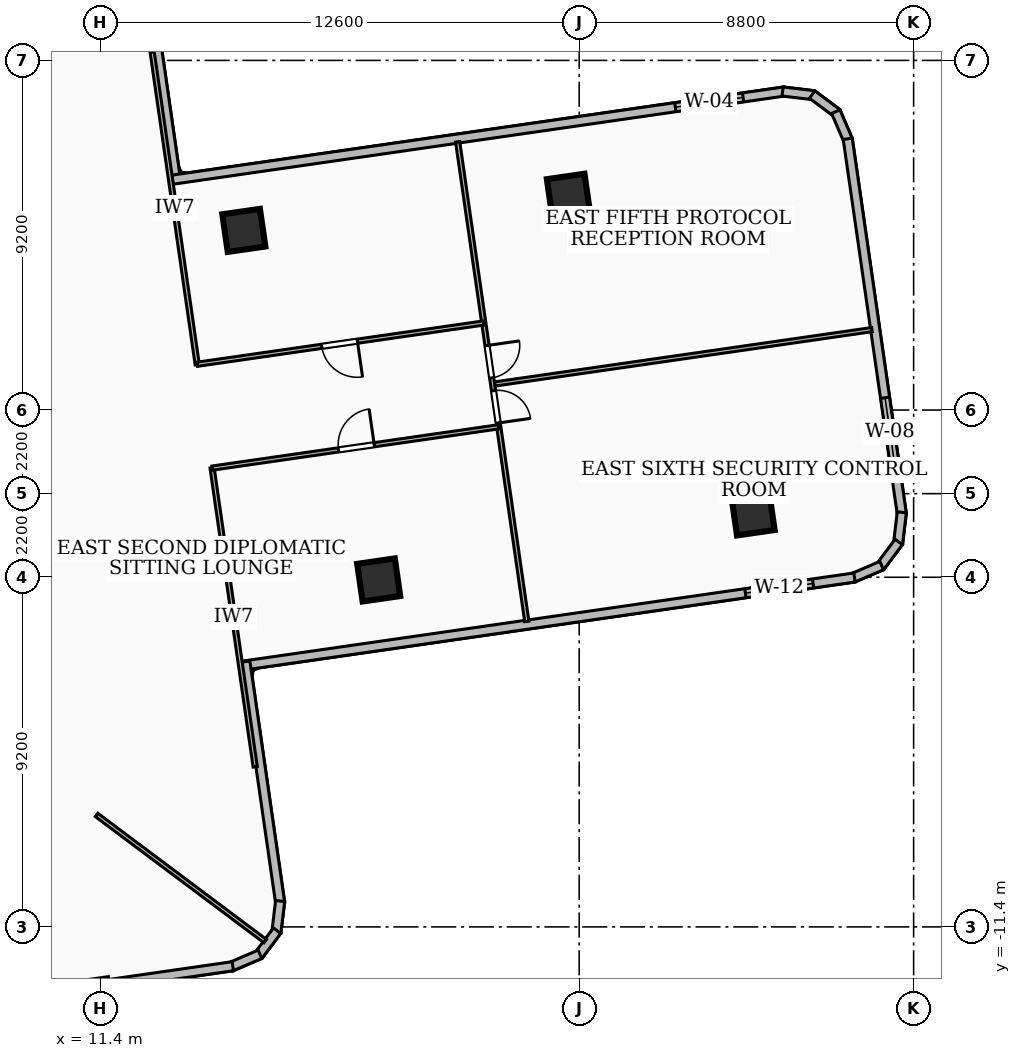
"""IFC4 building model, lengths in metres.
Left out: names, types, materials, properties, quantities, classifications, styles, units other than length and angle.
Written with IfcOpenShell. Run it as: python <this file> out.ifc"""

import sys

from ifc_helpers import new_model, si_unit, direction, frame, frame_2d, origin, origin_2d, place, context, subcontext, project, spatial, rectangle, extrude, element, fill, save


model = new_model("IFC4")
c1 = context("Model", 3, precision=1e-05, world=origin(), true_north=direction((0.0, 1.0)))
c2 = subcontext(c1, "Body", "Model", "MODEL_VIEW")
j1 = project(units=[si_unit("LENGTHUNIT", "METRE"), si_unit("PLANEANGLEUNIT", "RADIAN")], contexts=[c1])
p1 = place(None, origin())
s1 = spatial("IfcSite", under=j1, at=p1, CompositionType="ELEMENT")
p2 = place(p1, origin())
s2 = spatial("IfcBuilding", under=s1, at=p2, CompositionType="ELEMENT")
p3 = place(p2, frame((0.0, 0.0, 85.68)))
s3 = spatial("IfcBuildingStorey", under=s2, at=p3, CompositionType="ELEMENT", Elevation=85.68)
for number, where, z_axis, x_axis in (
    (1, (18.724, -2.271, 0.0), (0.0, 0.0, 1.0), (0.99, 0.143, 0.0)),
    (2, (15.175, 6.927, 0.0), (0.0, 0.0, 1.0), (0.99, 0.143, 0.0)),
    (3, (28.576, -0.533, 0.0), (0.0, 0.0, 1.0), (0.99, 0.143, 0.0)),
    (4, (23.715, 7.851, 0.0), (0.0, 0.0, 1.0), (0.99, 0.143, 0.0)),
):
    element("IfcColumn", number, at=place(p3, frame(where, z_axis=z_axis, x_axis=x_axis)), inside=s3, PredefinedType="COLUMN", context=c2, shape_type="SweptSolid", body=[
        extrude(rectangle(XDim=1.0, YDim=1.0, at=origin_2d()), origin(), (0.0, 0.0, 1.0), 3.6),
    ])
p4 = place(p3, frame((12.434, 14.885, 0.0), z_axis=(0.0, 0.0, 1.0), x_axis=(0.142692500085, -0.989767068769, 0.0)))
e5 = element("IfcWall", 5, at=p4, inside=s3, PredefinedType="SOLIDWALL", context=c2, shape_type="SweptSolid", body=[
    extrude(rectangle(XDim=6.775, YDim=0.24, at=frame_2d((3.388, 0.0))), origin(), (0.0, 0.0, 1.0), 3.34),
])
p5 = place(p3, frame((13.292, 8.26, 0.0), z_axis=(0.0, 0.0, 1.0), x_axis=(0.989770197797, 0.142670794326, 0.0)))
e6 = element("IfcWall", 6, at=p5, inside=s3, PredefinedType="SOLIDWALL", context=c2, shape_type="SweptSolid", body=[
    extrude(rectangle(XDim=16.275, YDim=0.24, at=frame_2d((8.138, 0.0))), origin(), (0.0, 0.0, 1.0), 3.34),
])
p6 = place(p5, frame((13.375, 0.0, 0.85)))
e7 = element("IfcOpeningElement", 7, at=p6, cuts=e6, PredefinedType="OPENING", context=c2, shape_type="SweptSolid", body=[
    extrude(rectangle(XDim=1.8, YDim=2.0, at=frame_2d((0.9, 1.0))), frame((0.0, 0.13, 0.0), z_axis=(0.0, -1.0, 0.0), x_axis=(1.0, 0.0, 0.0)), (0.0, 0.0, 1.0), 0.26),
])
p7 = place(p3, frame((29.351, 10.581, 0.0), z_axis=(0.0, 0.0, 1.0), x_axis=(0.992997305963, -0.118136998224, 0.0)))
e8 = element("IfcWall", 8, at=p7, inside=s3, PredefinedType="SOLIDWALL", context=c2, shape_type="SweptSolid", body=[
    extrude(rectangle(XDim=0.831, YDim=0.24, at=frame_2d((0.416, 0.0))), origin(), (0.0, 0.0, 1.0), 3.34),
])
p8 = place(p3, frame((30.131, 10.501, 0.0), z_axis=(0.0, 0.0, 1.0), x_axis=(0.800072018724, -0.599903963027, 0.0)))
e9 = element("IfcWall", 9, at=p8, inside=s3, PredefinedType="SOLIDWALL", context=c2, shape_type="SweptSolid", body=[
    extrude(rectangle(XDim=0.813, YDim=0.24, at=frame_2d((0.407, 0.0))), origin(), (0.0, 0.0, 1.0), 3.34),
])
p9 = place(p3, frame((30.752, 10.051, 0.0), z_axis=(0.0, 0.0, 1.0), x_axis=(0.395089773053, -0.91864251547, 0.0)))
e10 = element("IfcWall", 10, at=p9, inside=s3, PredefinedType="SOLIDWALL", context=c2, shape_type="SweptSolid", body=[
    extrude(rectangle(XDim=0.831, YDim=0.24, at=frame_2d((0.415, 0.0))), origin(), (0.0, 0.0, 1.0), 3.34),
])
p10 = place(p3, frame((31.066, 9.336, 0.0), z_axis=(0.0, 0.0, 1.0), x_axis=(0.142705661552, -0.98976517122, 0.0)))
e11 = element("IfcWall", 11, at=p10, inside=s3, PredefinedType="SOLIDWALL", context=c2, shape_type="SweptSolid", body=[
    extrude(rectangle(XDim=9.979, YDim=0.24, at=frame_2d((4.99, 0.0))), origin(), (0.0, 0.0, 1.0), 3.34),
])
p11 = place(p10, frame((6.884, 0.0, 0.85)))
e12 = element("IfcOpeningElement", 12, at=p11, cuts=e11, PredefinedType="OPENING", context=c2, shape_type="SweptSolid", body=[
    extrude(rectangle(XDim=1.8, YDim=1.8, at=frame_2d((0.9, 0.9))), frame((0.0, 0.13, 0.0), z_axis=(0.0, -1.0, 0.0), x_axis=(1.0, 0.0, 0.0)), (0.0, 0.0, 1.0), 0.26),
])
p12 = place(p3, frame((32.489, -0.491, 0.0), z_axis=(0.0, 0.0, 1.0), x_axis=(-0.119295842971, -0.992858752215, 0.0)))
e13 = element("IfcWall", 13, at=p12, inside=s3, PredefinedType="SOLIDWALL", context=c2, shape_type="SweptSolid", body=[
    extrude(rectangle(XDim=0.831, YDim=0.24, at=frame_2d((0.416, 0.0))), origin(), (0.0, 0.0, 1.0), 3.34),
])
p13 = place(p3, frame((32.408, -1.271, 0.0), z_axis=(0.0, 0.0, 1.0), x_axis=(-0.598415049045, -0.801186263659, 0.0)))
e14 = element("IfcWall", 14, at=p13, inside=s3, PredefinedType="SOLIDWALL", context=c2, shape_type="SweptSolid", body=[
    extrude(rectangle(XDim=0.814, YDim=0.24, at=frame_2d((0.407, 0.0))), origin(), (0.0, 0.0, 1.0), 3.34),
])
p14 = place(p3, frame((31.959, -1.893, 0.0), z_axis=(0.0, 0.0, 1.0), x_axis=(-0.919175455153, -0.393848299024, 0.0)))
e15 = element("IfcWall", 15, at=p14, inside=s3, PredefinedType="SOLIDWALL", context=c2, shape_type="SweptSolid", body=[
    extrude(rectangle(XDim=0.83, YDim=0.24, at=frame_2d((0.415, 0.0))), origin(), (0.0, 0.0, 1.0), 3.34),
])
p15 = place(p3, frame((31.244, -2.206, 0.0), z_axis=(0.0, 0.0, 1.0), x_axis=(-0.989771419035, -0.142662321802, 0.0)))
e16 = element("IfcWall", 16, at=p15, inside=s3, PredefinedType="SOLIDWALL", context=c2, shape_type="SweptSolid", body=[
    extrude(rectangle(XDim=16.276, YDim=0.24, at=frame_2d((8.138, 0.0))), origin(), (0.0, 0.0, 1.0), 3.34),
])
p16 = place(p15, frame((1.1, 0.0, 0.85)))
e17 = element("IfcOpeningElement", 17, at=p16, cuts=e16, PredefinedType="OPENING", context=c2, shape_type="SweptSolid", body=[
    extrude(rectangle(XDim=1.8, YDim=1.6, at=frame_2d((0.9, 0.8))), frame((0.0, 0.13, 0.0), z_axis=(0.0, -1.0, 0.0), x_axis=(1.0, 0.0, 0.0)), (0.0, 0.0, 1.0), 0.26),
])
p17 = place(p3, frame((15.215, -4.419, 0.0), z_axis=(0.0, 0.0, 1.0), x_axis=(0.14277438433, -0.989755260243, 0.0)))
e18 = element("IfcWall", 18, at=p17, inside=s3, PredefinedType="SOLIDWALL", context=c2, shape_type="SweptSolid", body=[
    extrude(rectangle(XDim=6.416, YDim=0.24, at=frame_2d((3.208, 0.0))), origin(), (0.0, 0.0, 1.0), 3.34),
])
p18 = place(p3, frame((16.13, -10.719, 0.0), z_axis=(0.0, 0.0, 1.0), x_axis=(-0.117847211411, -0.993031739051, 0.0)))
e19 = element("IfcWall", 19, at=p18, inside=s3, PredefinedType="SOLIDWALL", context=c2, shape_type="SweptSolid", body=[
    extrude(rectangle(XDim=0.831, YDim=0.24, at=frame_2d((0.416, 0.0))), origin(), (0.0, 0.0, 1.0), 3.34),
])
p19 = place(p3, frame((16.05, -11.499, 0.0), z_axis=(0.0, 0.0, 1.0), x_axis=(-0.599903963027, -0.800072018724, 0.0)))
e20 = element("IfcWall", 20, at=p19, inside=s3, PredefinedType="SOLIDWALL", context=c2, shape_type="SweptSolid", body=[
    extrude(rectangle(XDim=0.813, YDim=0.24, at=frame_2d((0.407, 0.0))), origin(), (0.0, 0.0, 1.0), 3.34),
])
p20 = place(p3, frame((15.6, -12.12, 0.0), z_axis=(0.0, 0.0, 1.0), x_axis=(-0.918795004047, -0.394735025731, 0.0)))
e21 = element("IfcWall", 21, at=p20, inside=s3, PredefinedType="SOLIDWALL", context=c2, shape_type="SweptSolid", body=[
    extrude(rectangle(XDim=0.831, YDim=0.24, at=frame_2d((0.415, 0.0))), origin(), (0.0, 0.0, 1.0), 3.34),
])
p21 = place(p3, frame((14.885, -12.434, 0.0), z_axis=(0.0, 0.0, 1.0), x_axis=(-0.989767068769, -0.142692500085, 0.0)))
e22 = element("IfcWall", 22, at=p21, inside=s3, PredefinedType="SOLIDWALL", context=c2, shape_type="SweptSolid", body=[
    extrude(rectangle(XDim=6.775, YDim=0.24, at=frame_2d((3.388, 0.0))), origin(), (0.0, 0.0, 1.0), 3.34),
])
p22 = place(p3, frame((7.766, 10.38, 0.0), z_axis=(0.0, 0.0, 1.0), x_axis=(0.598966195252, 0.800774310867, 0.0)))
e23 = element("IfcWall", 23, at=p22, inside=s3, PredefinedType="PARTITIONING", context=c2, shape_type="SweptSolid", body=[
    extrude(rectangle(XDim=6.691, YDim=0.11, at=frame_2d((3.346, 0.0))), origin(), (0.0, 0.0, 1.0), 3.34),
])
p23 = place(p3, frame((11.3, -8.454, 0.0), z_axis=(0.0, 0.0, 1.0), x_axis=(0.80074999449, -0.598998703107, 0.0)))
e24 = element("IfcWall", 24, at=p23, inside=s3, PredefinedType="PARTITIONING", context=c2, shape_type="SweptSolid", body=[
    extrude(rectangle(XDim=5.542, YDim=0.11, at=frame_2d((2.771, 0.0))), origin(), (0.0, 0.0, 1.0), 3.34),
])
p24 = place(p3, frame((13.949, 3.394, 0.0), z_axis=(0.0, 0.0, 1.0), x_axis=(-0.142725091033, 0.989762369657, 0.0)))
e25 = element("IfcWall", 25, at=p24, inside=s3, PredefinedType="PARTITIONING", context=c2, shape_type="SweptSolid", body=[
    extrude(rectangle(XDim=8.31, YDim=0.11, at=frame_2d((4.155, 0.0))), origin(), (0.0, 0.0, 1.0), 2.486),
])
p25 = place(p3, frame((15.474, -7.186, 0.0), z_axis=(0.0, 0.0, 1.0), x_axis=(-0.142779920322, 0.989754461648, 0.0)))
e26 = element("IfcWall", 26, at=p25, inside=s3, PredefinedType="PARTITIONING", context=c2, shape_type="SweptSolid", body=[
    extrude(rectangle(XDim=7.949, YDim=0.11, at=frame_2d((3.975, 0.0))), origin(), (0.0, 0.0, 1.0), 2.486),
])
p26 = place(p3, frame((21.489, 4.491, 0.0), z_axis=(0.0, 0.0, 1.0), x_axis=(-0.989774445133, -0.142641325577, 0.0)))
e27 = element("IfcWall", 27, at=p26, inside=s3, PredefinedType="PARTITIONING", context=c2, shape_type="SweptSolid", body=[
    extrude(rectangle(XDim=7.62, YDim=0.11, at=frame_2d((3.81, 0.0))), origin(), (0.0, 0.0, 1.0), 3.34),
])
p27 = place(p26, frame((3.36, 0.0, 0.0)))
e28 = element("IfcOpeningElement", 28, at=p27, cuts=e27, PredefinedType="OPENING", context=c2, shape_type="SweptSolid", body=[
    extrude(rectangle(XDim=0.95, YDim=2.08, at=frame_2d((0.475, 1.04))), frame((0.0, 0.065, 0.0), z_axis=(0.0, -1.0, 0.0), x_axis=(1.0, 0.0, 0.0)), (0.0, 0.0, 1.0), 0.13),
])
p28 = place(p3, frame((14.341, 0.672, 0.0), z_axis=(0.0, 0.0, 1.0), x_axis=(0.989774445133, 0.142641325577, 0.0)))
e29 = element("IfcWall", 29, at=p28, inside=s3, PredefinedType="PARTITIONING", context=c2, shape_type="SweptSolid", body=[
    extrude(rectangle(XDim=7.62, YDim=0.11, at=frame_2d((3.81, 0.0))), origin(), (0.0, 0.0, 1.0), 3.34),
])
p29 = place(p28, frame((3.36, 0.0, 0.0)))
e30 = element("IfcOpeningElement", 30, at=p29, cuts=e29, PredefinedType="OPENING", context=c2, shape_type="SweptSolid", body=[
    extrude(rectangle(XDim=0.95, YDim=2.08, at=frame_2d((0.475, 1.04))), frame((0.0, 0.065, 0.0), z_axis=(0.0, -1.0, 0.0), x_axis=(1.0, 0.0, 0.0)), (0.0, 0.0, 1.0), 0.13),
])
p30 = place(p3, frame((21.781, 2.886, 0.0), z_axis=(0.0, 0.0, 1.0), x_axis=(0.989773870341, 0.142645313942, 0.0)))
e31 = element("IfcWall", 31, at=p30, inside=s3, PredefinedType="PARTITIONING", context=c2, shape_type="SweptSolid", body=[
    extrude(rectangle(XDim=10.024, YDim=0.11, at=frame_2d((5.012, 0.0))), origin(), (0.0, 0.0, 1.0), 2.832),
])
p31 = place(p3, frame((20.802, 9.257, 0.0), z_axis=(0.0, 0.0, 1.0), x_axis=(0.142667743944, -0.98977063749, 0.0)))
e32 = element("IfcWall", 32, at=p31, inside=s3, PredefinedType="PARTITIONING", context=c2, shape_type="SweptSolid", body=[
    extrude(rectangle(XDim=12.75, YDim=0.11, at=frame_2d((6.375, 0.0))), origin(), (0.0, 0.0, 1.0), 2.486),
])
p32 = place(p31, frame((6.615, 0.0, 0.0)))
e33 = element("IfcOpeningElement", 33, at=p32, cuts=e32, PredefinedType="OPENING", context=c2, shape_type="SweptSolid", body=[
    extrude(rectangle(XDim=0.86, YDim=2.04, at=frame_2d((0.43, 1.02))), frame((0.0, 0.065, 0.0), z_axis=(0.0, -1.0, 0.0), x_axis=(1.0, 0.0, 0.0)), (0.0, 0.0, 1.0), 0.13),
])
p33 = place(p31, frame((5.415, 0.0, 0.0)))
e34 = element("IfcOpeningElement", 34, at=p33, cuts=e32, PredefinedType="OPENING", context=c2, shape_type="SweptSolid", body=[
    extrude(rectangle(XDim=0.86, YDim=2.04, at=frame_2d((0.43, 1.02))), frame((0.0, 0.065, 0.0), z_axis=(0.0, -1.0, 0.0), x_axis=(1.0, 0.0, 0.0)), (0.0, 0.0, 1.0), 0.13),
])
p34 = place(p3, frame((3.394, -13.949, 0.0), z_axis=(0.0, 0.0, 1.0), x_axis=(0.989762369657, 0.142725091033, 0.0)))
e35 = element("IfcWall", 35, at=p34, inside=s3, PredefinedType="PARTITIONING", context=c2, shape_type="SweptSolid", body=[
    extrude(rectangle(XDim=8.31, YDim=0.11, at=frame_2d((4.155, 0.0))), origin(), (0.0, 0.0, 1.0), 2.486),
])
p35 = place(p6, origin())
e36 = element("IfcWindow", 36, at=p35, inside=s3, PartitioningType="SINGLE_PANEL", PredefinedType="WINDOW", context=c2, shape_type="SweptSolid", body=[
    extrude(rectangle(XDim=1.8, YDim=2.0, at=frame_2d((0.9, 1.0))), frame((0.0, 0.03, 0.0), z_axis=(0.0, -1.0, 0.0), x_axis=(1.0, 0.0, 0.0)), (0.0, 0.0, 1.0), 0.06),
])
fill(e7, e36)
p36 = place(p11, origin())
e37 = element("IfcWindow", 37, at=p36, inside=s3, PartitioningType="SINGLE_PANEL", PredefinedType="WINDOW", context=c2, shape_type="SweptSolid", body=[
    extrude(rectangle(XDim=1.8, YDim=1.8, at=frame_2d((0.9, 0.9))), frame((0.0, 0.03, 0.0), z_axis=(0.0, -1.0, 0.0), x_axis=(1.0, 0.0, 0.0)), (0.0, 0.0, 1.0), 0.06),
])
fill(e12, e37)
p37 = place(p16, origin())
e38 = element("IfcWindow", 38, at=p37, inside=s3, PartitioningType="SINGLE_PANEL", PredefinedType="WINDOW", context=c2, shape_type="SweptSolid", body=[
    extrude(rectangle(XDim=1.8, YDim=1.6, at=frame_2d((0.9, 0.8))), frame((0.0, 0.03, 0.0), z_axis=(0.0, -1.0, 0.0), x_axis=(1.0, 0.0, 0.0)), (0.0, 0.0, 1.0), 0.06),
])
fill(e17, e38)
p38 = place(p27, origin())
e39 = element("IfcDoor", 39, at=p38, inside=s3, OperationType="SINGLE_SWING_LEFT", PredefinedType="DOOR", context=c2, shape_type="SweptSolid", body=[
    extrude(rectangle(XDim=0.95, YDim=2.08, at=frame_2d((0.475, 1.04))), frame((0.0, 0.025, 0.0), z_axis=(0.0, -1.0, 0.0), x_axis=(1.0, 0.0, 0.0)), (0.0, 0.0, 1.0), 0.05),
])
fill(e28, e39)
p39 = place(p29, origin())
e40 = element("IfcDoor", 40, at=p39, inside=s3, OperationType="SINGLE_SWING_RIGHT", PredefinedType="DOOR", context=c2, shape_type="SweptSolid", body=[
    extrude(rectangle(XDim=0.95, YDim=2.08, at=frame_2d((0.475, 1.04))), frame((0.0, 0.025, 0.0), z_axis=(0.0, -1.0, 0.0), x_axis=(1.0, 0.0, 0.0)), (0.0, 0.0, 1.0), 0.05),
])
fill(e30, e40)
p40 = place(p32, origin())
e41 = element("IfcDoor", 41, at=p40, inside=s3, OperationType="SINGLE_SWING_RIGHT", PredefinedType="DOOR", context=c2, shape_type="SweptSolid", body=[
    extrude(rectangle(XDim=0.86, YDim=2.04, at=frame_2d((0.43, 1.02))), frame((0.0, 0.025, 0.0), z_axis=(0.0, -1.0, 0.0), x_axis=(1.0, 0.0, 0.0)), (0.0, 0.0, 1.0), 0.05),
])
fill(e33, e41)
p41 = place(p33, origin())
e42 = element("IfcDoor", 42, at=p41, inside=s3, OperationType="SINGLE_SWING_LEFT", PredefinedType="DOOR", context=c2, shape_type="SweptSolid", body=[
    extrude(rectangle(XDim=0.86, YDim=2.04, at=frame_2d((0.43, 1.02))), frame((0.0, 0.025, 0.0), z_axis=(0.0, -1.0, 0.0), x_axis=(1.0, 0.0, 0.0)), (0.0, 0.0, 1.0), 0.05),
])
fill(e34, e42)
save(model, sys.argv[1])
